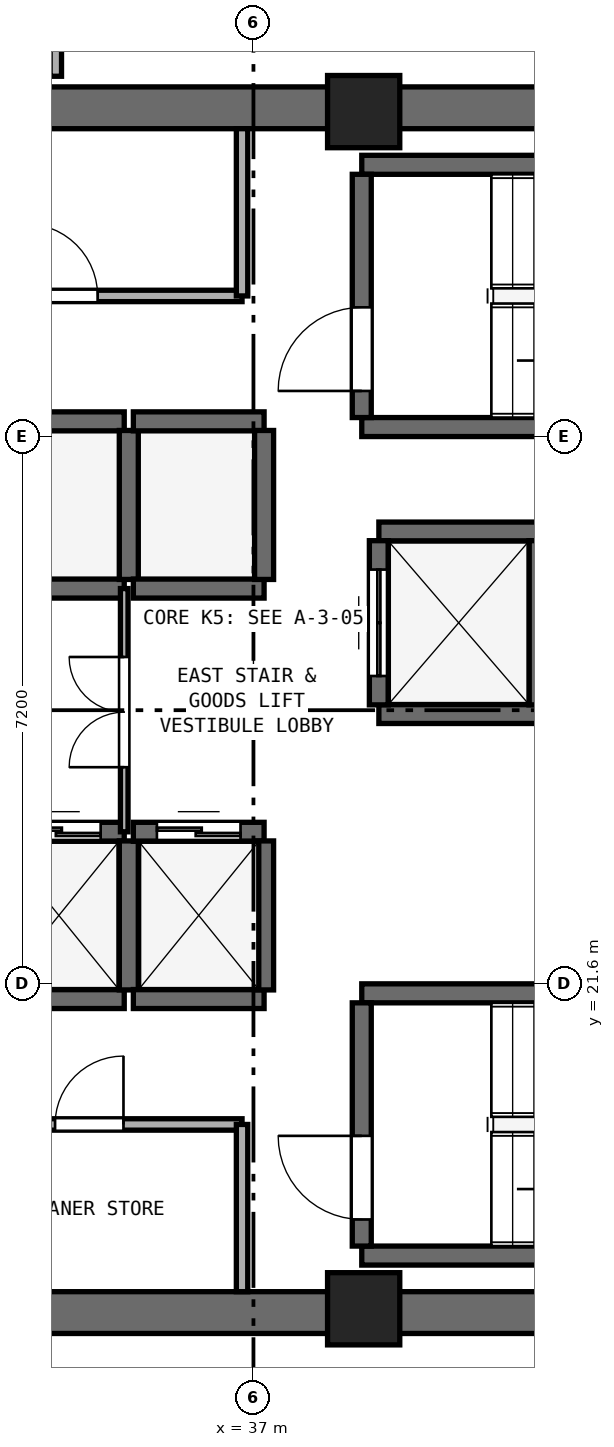
"""IFC4 building model, lengths in metres.
Left out: names, types, materials, properties, quantities, classifications, styles, units other than length and angle.
Written with IfcOpenShell. Run it as: python <this file> out.ifc"""

import sys

from ifc_helpers import new_model, si_unit, direction, frame, frame_2d, origin, origin_2d, place, context, subcontext, project, spatial, rectangle, extrude, element, fill, save


model = new_model("IFC4")
c1 = context("Model", 3, precision=1e-05, world=origin(), true_north=direction((0.0, 1.0)))
c2 = subcontext(c1, "Body", "Model", "MODEL_VIEW")
j1 = project(units=[si_unit("LENGTHUNIT", "METRE"), si_unit("PLANEANGLEUNIT", "RADIAN")], contexts=[c1])
p1 = place(None, origin())
s1 = spatial("IfcSite", under=j1, at=p1, CompositionType="ELEMENT")
p2 = place(p1, origin())
s2 = spatial("IfcBuilding", under=s1, at=p2, CompositionType="ELEMENT")
p3 = place(p2, frame((0.0, 0.0, 208.6)))
s3 = spatial("IfcBuildingStorey", under=s2, at=p3, CompositionType="ELEMENT", Elevation=208.6)
for number, where, z_axis, x_axis in (
    (1, (25.4, 17.275, 0.0), (0.0, 0.0, 1.0), (1.0, 0.0, 0.0)),
    (2, (25.4, 33.125, 0.0), (0.0, 0.0, 1.0), (1.0, 0.0, 0.0)),
):
    element("IfcWall", number, at=place(p3, frame(where, z_axis=z_axis, x_axis=x_axis)), inside=s3, PredefinedType="SHEAR", context=c2, shape_type="SweptSolid", body=[
        extrude(rectangle(XDim=23.2, YDim=0.55, at=frame_2d((11.6, 0.0))), origin(), (0.0, 0.0, 1.0), 3.54),
    ])
for number, where, z_axis, x_axis in (
    (3, (38.45, 17.325, 0.0), (0.0, 0.0, 1.0), (1.0, 0.0, 0.0)),
    (4, (38.45, 33.075, 0.0), (0.0, 0.0, 1.0), (1.0, 0.0, 0.0)),
):
    element("IfcColumn", number, at=place(p3, frame(where, z_axis=z_axis, x_axis=x_axis)), inside=s3, PredefinedType="PILASTER", context=c2, shape_type="SweptSolid", body=[
        extrude(rectangle(XDim=0.95, YDim=0.95, at=origin_2d()), origin(), (0.0, 0.0, 1.0), 3.8),
    ])
for number, where, z_axis, x_axis in (
    (5, (38.425, 28.925, 0.0), (0.0, 0.0, 1.0), (1.0, 0.0, 0.0)),
    (6, (38.425, 32.375, 0.0), (0.0, 0.0, 1.0), (1.0, 0.0, 0.0)),
):
    element("IfcWall", number, at=place(p3, frame(where, z_axis=z_axis, x_axis=x_axis)), inside=s3, PredefinedType="SHEAR", context=c2, shape_type="SweptSolid", body=[
        extrude(rectangle(XDim=7.3, YDim=0.25, at=frame_2d((3.65, 0.0))), origin(), (0.0, 0.0, 1.0), 3.54),
    ])
p4 = place(p3, frame((38.425, 29.05, 0.0), z_axis=(0.0, 0.0, 1.0), x_axis=(0.0, 1.0, 0.0)))
e7 = element("IfcWall", 7, at=p4, inside=s3, PredefinedType="SHEAR", context=c2, shape_type="SweptSolid", body=[
    extrude(rectangle(XDim=3.2, YDim=0.25, at=frame_2d((1.6, 0.0))), origin(), (0.0, 0.0, 1.0), 3.54),
])
p5 = place(p4, frame((0.35, 0.0, 0.0)))
e8 = element("IfcOpeningElement", 8, at=p5, cuts=e7, PredefinedType="OPENING", context=c2, shape_type="SweptSolid", body=[
    extrude(rectangle(XDim=1.1, YDim=2.15, at=frame_2d((0.55, 1.075))), frame((0.0, 0.135, 0.0), z_axis=(0.0, -1.0, 0.0), x_axis=(1.0, 0.0, 0.0)), (0.0, 0.0, 1.0), 0.27),
])
for number, where, z_axis, x_axis in (
    (9, (38.425, 18.025, 0.0), (0.0, 0.0, 1.0), (1.0, 0.0, 0.0)),
    (10, (38.425, 21.475, 0.0), (0.0, 0.0, 1.0), (1.0, 0.0, 0.0)),
):
    element("IfcWall", number, at=place(p3, frame(where, z_axis=z_axis, x_axis=x_axis)), inside=s3, PredefinedType="SHEAR", context=c2, shape_type="SweptSolid", body=[
        extrude(rectangle(XDim=7.3, YDim=0.25, at=frame_2d((3.65, 0.0))), origin(), (0.0, 0.0, 1.0), 3.54),
    ])
p6 = place(p3, frame((38.425, 18.15, 0.0), z_axis=(0.0, 0.0, 1.0), x_axis=(0.0, 1.0, 0.0)))
e11 = element("IfcWall", 11, at=p6, inside=s3, PredefinedType="SHEAR", context=c2, shape_type="SweptSolid", body=[
    extrude(rectangle(XDim=3.2, YDim=0.25, at=frame_2d((1.6, 0.0))), origin(), (0.0, 0.0, 1.0), 3.54),
])
p7 = place(p6, frame((0.35, 0.0, 0.0)))
e12 = element("IfcOpeningElement", 12, at=p7, cuts=e11, PredefinedType="OPENING", context=c2, shape_type="SweptSolid", body=[
    extrude(rectangle(XDim=1.1, YDim=2.15, at=frame_2d((0.55, 1.075))), frame((0.0, 0.135, 0.0), z_axis=(0.0, -1.0, 0.0), x_axis=(1.0, 0.0, 0.0)), (0.0, 0.0, 1.0), 0.27),
])
p8 = place(p3, frame((33.58, 21.4, 0.0), z_axis=(0.0, 0.0, 1.0), x_axis=(1.0, 0.0, 0.0)))
e13 = element("IfcWall", 13, at=p8, inside=s3, PredefinedType="SHEAR", context=c2, shape_type="SweptSolid", body=[
    extrude(rectangle(XDim=1.72, YDim=0.25, at=frame_2d((0.86, 0.0))), origin(), (0.0, 0.0, 1.0), 3.54),
])
p9 = place(p3, frame((33.58, 23.6, 0.0), z_axis=(0.0, 0.0, 1.0), x_axis=(1.0, 0.0, 0.0)))
e14 = element("IfcWall", 14, at=p9, inside=s3, PredefinedType="SHEAR", context=c2, shape_type="SweptSolid", body=[
    extrude(rectangle(XDim=1.72, YDim=0.25, at=frame_2d((0.86, 0.0))), origin(), (0.0, 0.0, 1.0), 3.54),
])
p10 = place(p9, frame((0.31, 0.0, 0.0)))
e15 = element("IfcOpeningElement", 15, at=p10, cuts=e14, PredefinedType="OPENING", context=c2, shape_type="SweptSolid", body=[
    extrude(rectangle(XDim=1.1, YDim=2.15, at=frame_2d((0.55, 1.075))), frame((0.0, 0.135, 0.0), z_axis=(0.0, -1.0, 0.0), x_axis=(1.0, 0.0, 0.0)), (0.0, 0.0, 1.0), 0.27),
])
p11 = place(p3, frame((35.36, 21.52, 0.0), z_axis=(0.0, 0.0, 1.0), x_axis=(0.0, 1.0, 0.0)))
e16 = element("IfcWall", 16, at=p11, inside=s3, PredefinedType="SHEAR", context=c2, shape_type="SweptSolid", body=[
    extrude(rectangle(XDim=1.96, YDim=0.25, at=frame_2d((0.98, 0.0))), origin(), (0.0, 0.0, 1.0), 3.54),
])
p12 = place(p3, frame((35.42, 21.4, 0.0), z_axis=(0.0, 0.0, 1.0), x_axis=(1.0, 0.0, 0.0)))
e17 = element("IfcWall", 17, at=p12, inside=s3, PredefinedType="SHEAR", context=c2, shape_type="SweptSolid", body=[
    extrude(rectangle(XDim=1.72, YDim=0.25, at=frame_2d((0.86, 0.0))), origin(), (0.0, 0.0, 1.0), 3.54),
])
p13 = place(p3, frame((35.42, 23.6, 0.0), z_axis=(0.0, 0.0, 1.0), x_axis=(1.0, 0.0, 0.0)))
e18 = element("IfcWall", 18, at=p13, inside=s3, PredefinedType="SHEAR", context=c2, shape_type="SweptSolid", body=[
    extrude(rectangle(XDim=1.72, YDim=0.25, at=frame_2d((0.86, 0.0))), origin(), (0.0, 0.0, 1.0), 3.54),
])
p14 = place(p13, frame((0.31, 0.0, 0.0)))
e19 = element("IfcOpeningElement", 19, at=p14, cuts=e18, PredefinedType="OPENING", context=c2, shape_type="SweptSolid", body=[
    extrude(rectangle(XDim=1.1, YDim=2.15, at=frame_2d((0.55, 1.075))), frame((0.0, 0.135, 0.0), z_axis=(0.0, -1.0, 0.0), x_axis=(1.0, 0.0, 0.0)), (0.0, 0.0, 1.0), 0.27),
])
p15 = place(p3, frame((37.14, 21.52, 0.0), z_axis=(0.0, 0.0, 1.0), x_axis=(0.0, 1.0, 0.0)))
e20 = element("IfcWall", 20, at=p15, inside=s3, PredefinedType="SHEAR", context=c2, shape_type="SweptSolid", body=[
    extrude(rectangle(XDim=1.96, YDim=0.25, at=frame_2d((0.98, 0.0))), origin(), (0.0, 0.0, 1.0), 3.54),
])
for number, where, z_axis, x_axis in (
    (21, (33.58, 26.8, 0.0), (0.0, 0.0, 1.0), (1.0, 0.0, 0.0)),
    (22, (33.58, 29.0, 0.0), (0.0, 0.0, 1.0), (1.0, 0.0, 0.0)),
):
    element("IfcWall", number, at=place(p3, frame(where, z_axis=z_axis, x_axis=x_axis)), inside=s3, PredefinedType="SHEAR", context=c2, shape_type="SweptSolid", body=[
        extrude(rectangle(XDim=1.72, YDim=0.25, at=frame_2d((0.86, 0.0))), origin(), (0.0, 0.0, 1.0), 3.54),
    ])
p16 = place(p3, frame((35.36, 26.92, 0.0), z_axis=(0.0, 0.0, 1.0), x_axis=(0.0, 1.0, 0.0)))
e23 = element("IfcWall", 23, at=p16, inside=s3, PredefinedType="SHEAR", context=c2, shape_type="SweptSolid", body=[
    extrude(rectangle(XDim=1.96, YDim=0.25, at=frame_2d((0.98, 0.0))), origin(), (0.0, 0.0, 1.0), 3.54),
])
for number, where, z_axis, x_axis in (
    (24, (35.42, 26.8, 0.0), (0.0, 0.0, 1.0), (1.0, 0.0, 0.0)),
    (25, (35.42, 29.0, 0.0), (0.0, 0.0, 1.0), (1.0, 0.0, 0.0)),
):
    element("IfcWall", number, at=place(p3, frame(where, z_axis=z_axis, x_axis=x_axis)), inside=s3, PredefinedType="SHEAR", context=c2, shape_type="SweptSolid", body=[
        extrude(rectangle(XDim=1.72, YDim=0.25, at=frame_2d((0.86, 0.0))), origin(), (0.0, 0.0, 1.0), 3.54),
    ])
p17 = place(p3, frame((37.14, 26.92, 0.0), z_axis=(0.0, 0.0, 1.0), x_axis=(0.0, 1.0, 0.0)))
e26 = element("IfcWall", 26, at=p17, inside=s3, PredefinedType="SHEAR", context=c2, shape_type="SweptSolid", body=[
    extrude(rectangle(XDim=1.96, YDim=0.25, at=frame_2d((0.98, 0.0))), origin(), (0.0, 0.0, 1.0), 3.54),
])
for number, where, z_axis, x_axis in (
    (27, (38.65, 25.15, 0.0), (0.0, 0.0, 1.0), (1.0, 0.0, 0.0)),
    (28, (38.65, 27.55, 0.0), (0.0, 0.0, 1.0), (1.0, 0.0, 0.0)),
):
    element("IfcWall", number, at=place(p3, frame(where, z_axis=z_axis, x_axis=x_axis)), inside=s3, PredefinedType="SHEAR", context=c2, shape_type="SweptSolid", body=[
        extrude(rectangle(XDim=2.1, YDim=0.25, at=frame_2d((1.05, 0.0))), origin(), (0.0, 0.0, 1.0), 3.54),
    ])
p18 = place(p3, frame((38.65, 25.27, 0.0), z_axis=(0.0, 0.0, 1.0), x_axis=(0.0, 1.0, 0.0)))
e29 = element("IfcWall", 29, at=p18, inside=s3, PredefinedType="SHEAR", context=c2, shape_type="SweptSolid", body=[
    extrude(rectangle(XDim=2.16, YDim=0.25, at=frame_2d((1.08, 0.0))), origin(), (0.0, 0.0, 1.0), 3.54),
])
p19 = place(p18, frame((0.38, 0.0, 0.0)))
e30 = element("IfcOpeningElement", 30, at=p19, cuts=e29, PredefinedType="OPENING", context=c2, shape_type="SweptSolid", body=[
    extrude(rectangle(XDim=1.4, YDim=2.2, at=frame_2d((0.7, 1.1))), frame((0.0, 0.135, 0.0), z_axis=(0.0, -1.0, 0.0), x_axis=(1.0, 0.0, 0.0)), (0.0, 0.0, 1.0), 0.27),
])
p20 = place(p3, frame((40.75, 25.27, 0.0), z_axis=(0.0, 0.0, 1.0), x_axis=(0.0, 1.0, 0.0)))
e31 = element("IfcWall", 31, at=p20, inside=s3, PredefinedType="SHEAR", context=c2, shape_type="SweptSolid", body=[
    extrude(rectangle(XDim=2.16, YDim=0.25, at=frame_2d((1.08, 0.0))), origin(), (0.0, 0.0, 1.0), 3.54),
])
p21 = place(p3, frame((32.1, 30.65, 0.0), z_axis=(0.0, 0.0, 1.0), x_axis=(1.0, 0.0, 0.0)))
e32 = element("IfcWall", 32, at=p21, inside=s3, PredefinedType="PARTITIONING", context=c2, shape_type="SweptSolid", body=[
    extrude(rectangle(XDim=4.75, YDim=0.15, at=frame_2d((2.375, 0.0))), origin(), (0.0, 0.0, 1.0), 3.54),
])
p22 = place(p21, frame((1.9, 0.0, 0.0)))
e33 = element("IfcOpeningElement", 33, at=p22, cuts=e32, PredefinedType="OPENING", context=c2, shape_type="SweptSolid", body=[
    extrude(rectangle(XDim=0.95, YDim=2.1, at=frame_2d((0.475, 1.05))), frame((0.0, 0.085, 0.0), z_axis=(0.0, -1.0, 0.0), x_axis=(1.0, 0.0, 0.0)), (0.0, 0.0, 1.0), 0.17),
])
p23 = place(p3, frame((36.85, 30.65, 0.0), z_axis=(0.0, 0.0, 1.0), x_axis=(0.0, 1.0, 0.0)))
e34 = element("IfcWall", 34, at=p23, inside=s3, PredefinedType="PARTITIONING", context=c2, shape_type="SweptSolid", body=[
    extrude(rectangle(XDim=2.2, YDim=0.15, at=frame_2d((1.1, 0.0))), origin(), (0.0, 0.0, 1.0), 3.54),
])
p24 = place(p3, frame((32.83, 19.75, 0.0), z_axis=(0.0, 0.0, 1.0), x_axis=(1.0, 0.0, 0.0)))
e35 = element("IfcWall", 35, at=p24, inside=s3, PredefinedType="PARTITIONING", context=c2, shape_type="SweptSolid", body=[
    extrude(rectangle(XDim=4.02, YDim=0.15, at=frame_2d((2.01, 0.0))), origin(), (0.0, 0.0, 1.0), 3.54),
])
p25 = place(p24, frame((1.56, 0.0, 0.0)))
e36 = element("IfcOpeningElement", 36, at=p25, cuts=e35, PredefinedType="OPENING", context=c2, shape_type="SweptSolid", body=[
    extrude(rectangle(XDim=0.9, YDim=2.1, at=frame_2d((0.45, 1.05))), frame((0.0, 0.085, 0.0), z_axis=(0.0, -1.0, 0.0), x_axis=(1.0, 0.0, 0.0)), (0.0, 0.0, 1.0), 0.17),
])
p26 = place(p3, frame((36.85, 17.55, 0.0), z_axis=(0.0, 0.0, 1.0), x_axis=(0.0, 1.0, 0.0)))
e37 = element("IfcWall", 37, at=p26, inside=s3, PredefinedType="PARTITIONING", context=c2, shape_type="SweptSolid", body=[
    extrude(rectangle(XDim=2.2, YDim=0.15, at=frame_2d((1.1, 0.0))), origin(), (0.0, 0.0, 1.0), 3.54),
])
p27 = place(p3, frame((35.3, 23.6, 0.0), z_axis=(0.0, 0.0, 1.0), x_axis=(0.0, 1.0, 0.0)))
e38 = element("IfcWall", 38, at=p27, inside=s3, PredefinedType="PARTITIONING", context=c2, shape_type="SweptSolid", body=[
    extrude(rectangle(XDim=3.2, YDim=0.1, at=frame_2d((1.6, 0.0))), origin(), (0.0, 0.0, 1.0), 3.54),
])
p28 = place(p27, frame((0.85, 0.0, 0.0)))
e39 = element("IfcOpeningElement", 39, at=p28, cuts=e38, PredefinedType="OPENING", context=c2, shape_type="SweptSolid", body=[
    extrude(rectangle(XDim=1.45, YDim=2.12, at=frame_2d((0.725, 1.06))), frame((0.0, 0.06, 0.0), z_axis=(0.0, -1.0, 0.0), x_axis=(1.0, 0.0, 0.0)), (0.0, 0.0, 1.0), 0.12),
])
p29 = place(p3, frame((34.4, 33.54, 0.0), z_axis=(0.0, 0.0, 1.0), x_axis=(0.0, 1.0, 0.0)))
e40 = element("IfcWall", 40, at=p29, inside=s3, PredefinedType="PARTITIONING", context=c2, shape_type="SweptSolid", body=[
    extrude(rectangle(XDim=3.71, YDim=0.15, at=frame_2d((1.855, 0.0))), origin(), (0.0, 0.0, 1.0), 3.54),
])
p30 = place(p29, frame((1.355, 0.0, 0.0)))
e41 = element("IfcOpeningElement", 41, at=p30, cuts=e40, PredefinedType="OPENING", context=c2, shape_type="SweptSolid", body=[
    extrude(rectangle(XDim=1.0, YDim=2.12, at=frame_2d((0.5, 1.06))), frame((0.0, 0.085, 0.0), z_axis=(0.0, -1.0, 0.0), x_axis=(1.0, 0.0, 0.0)), (0.0, 0.0, 1.0), 0.17),
])
p31 = place(p5, origin())
e42 = element("IfcDoor", 42, at=p31, inside=s3, OperationType="SINGLE_SWING_LEFT", PredefinedType="DOOR", context=c2, shape_type="SweptSolid", body=[
    extrude(rectangle(XDim=1.1, YDim=2.15, at=frame_2d((0.55, 1.075))), frame((0.0, 0.025, 0.0), z_axis=(0.0, -1.0, 0.0), x_axis=(1.0, 0.0, 0.0)), (0.0, 0.0, 1.0), 0.05),
])
fill(e8, e42)
p32 = place(p7, origin())
e43 = element("IfcDoor", 43, at=p32, inside=s3, OperationType="SINGLE_SWING_RIGHT", PredefinedType="DOOR", context=c2, shape_type="SweptSolid", body=[
    extrude(rectangle(XDim=1.1, YDim=2.15, at=frame_2d((0.55, 1.075))), frame((0.0, 0.025, 0.0), z_axis=(0.0, -1.0, 0.0), x_axis=(1.0, 0.0, 0.0)), (0.0, 0.0, 1.0), 0.05),
])
fill(e12, e43)
p33 = place(p10, origin())
e44 = element("IfcDoor", 44, at=p33, inside=s3, OperationType="DOUBLE_DOOR_SLIDING", PredefinedType="DOOR", context=c2, shape_type="SweptSolid", body=[
    extrude(rectangle(XDim=1.1, YDim=2.15, at=frame_2d((0.55, 1.075))), frame((0.0, 0.025, 0.0), z_axis=(0.0, -1.0, 0.0), x_axis=(1.0, 0.0, 0.0)), (0.0, 0.0, 1.0), 0.05),
])
fill(e15, e44)
p34 = place(p14, origin())
e45 = element("IfcDoor", 45, at=p34, inside=s3, OperationType="DOUBLE_DOOR_SLIDING", PredefinedType="DOOR", context=c2, shape_type="SweptSolid", body=[
    extrude(rectangle(XDim=1.1, YDim=2.15, at=frame_2d((0.55, 1.075))), frame((0.0, 0.025, 0.0), z_axis=(0.0, -1.0, 0.0), x_axis=(1.0, 0.0, 0.0)), (0.0, 0.0, 1.0), 0.05),
])
fill(e19, e45)
p35 = place(p19, origin())
e46 = element("IfcDoor", 46, at=p35, inside=s3, OperationType="DOUBLE_DOOR_SLIDING", PredefinedType="DOOR", context=c2, shape_type="SweptSolid", body=[
    extrude(rectangle(XDim=1.4, YDim=2.2, at=frame_2d((0.7, 1.1))), frame((0.0, 0.025, 0.0), z_axis=(0.0, -1.0, 0.0), x_axis=(1.0, 0.0, 0.0)), (0.0, 0.0, 1.0), 0.05),
])
fill(e30, e46)
p36 = place(p22, origin())
e47 = element("IfcDoor", 47, at=p36, inside=s3, OperationType="SINGLE_SWING_LEFT", PredefinedType="DOOR", context=c2, shape_type="SweptSolid", body=[
    extrude(rectangle(XDim=0.95, YDim=2.1, at=frame_2d((0.475, 1.05))), frame((0.0, 0.025, 0.0), z_axis=(0.0, -1.0, 0.0), x_axis=(1.0, 0.0, 0.0)), (0.0, 0.0, 1.0), 0.05),
])
fill(e33, e47)
p37 = place(p25, origin())
e48 = element("IfcDoor", 48, at=p37, inside=s3, OperationType="SINGLE_SWING_RIGHT", PredefinedType="DOOR", context=c2, shape_type="SweptSolid", body=[
    extrude(rectangle(XDim=0.9, YDim=2.1, at=frame_2d((0.45, 1.05))), frame((0.0, 0.025, 0.0), z_axis=(0.0, -1.0, 0.0), x_axis=(1.0, 0.0, 0.0)), (0.0, 0.0, 1.0), 0.05),
])
fill(e36, e48)
p38 = place(p28, origin())
e49 = element("IfcDoor", 49, at=p38, inside=s3, OperationType="DOUBLE_DOOR_SINGLE_SWING", PredefinedType="DOOR", context=c2, shape_type="SweptSolid", body=[
    extrude(rectangle(XDim=1.45, YDim=2.12, at=frame_2d((0.725, 1.06))), frame((0.0, 0.025, 0.0), z_axis=(0.0, -1.0, 0.0), x_axis=(1.0, 0.0, 0.0)), (0.0, 0.0, 1.0), 0.05),
])
fill(e39, e49)
save(model, sys.argv[1])
